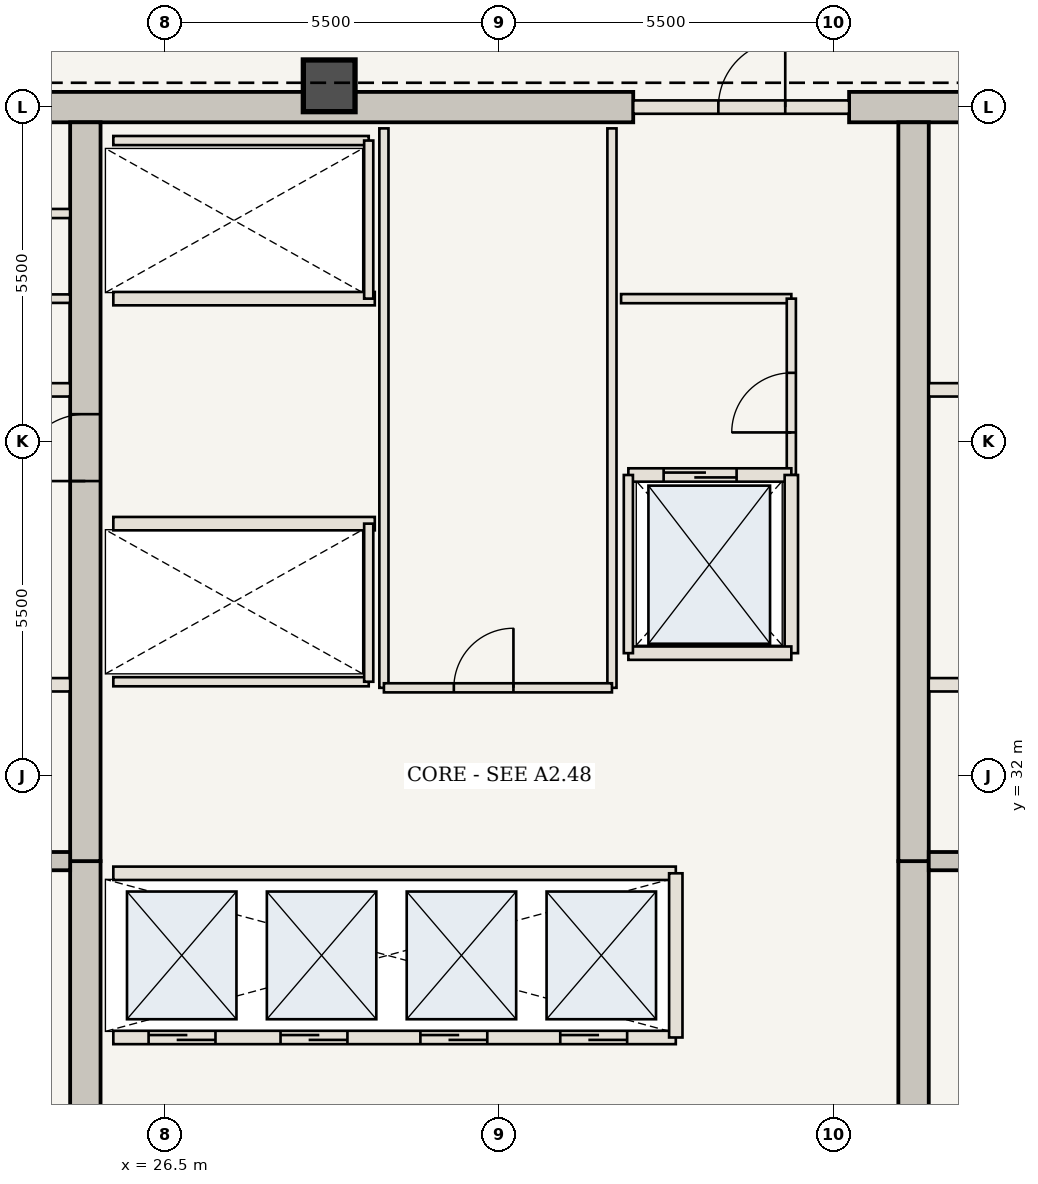
"""IFC4 building model, lengths in metres.
Left out: names, types, materials, properties, quantities, classifications, styles, units other than length and angle.
Written with IfcOpenShell. Run it as: python <this file> out.ifc"""

import sys

from ifc_helpers import new_model, si_unit, direction, frame, frame_2d, origin, origin_2d, place, context, subcontext, project, spatial, rectangle, extrude, element, fill, save


model = new_model("IFC4")
c1 = context("Model", 3, precision=1e-05, world=origin(), true_north=direction((0.0, 1.0)))
c2 = subcontext(c1, "Body", "Model", "MODEL_VIEW")
j1 = project(units=[si_unit("LENGTHUNIT", "METRE"), si_unit("PLANEANGLEUNIT", "RADIAN")], contexts=[c1])
p1 = place(None, origin())
s1 = spatial("IfcSite", under=j1, at=p1, CompositionType="ELEMENT")
p2 = place(p1, origin())
s2 = spatial("IfcBuilding", under=s1, at=p2, CompositionType="ELEMENT")
p3 = place(p2, frame((0.0, 0.0, 217.7)))
s3 = spatial("IfcBuildingStorey", under=s2, at=p3, CompositionType="ELEMENT", Elevation=217.7)
p4 = place(p3, frame((21.41, 43.0, 0.0), z_axis=(0.0, 0.0, 1.0), x_axis=(1.0, 0.0, 0.0)))
e1 = element("IfcWall", 1, at=p4, inside=s3, PredefinedType="SHEAR", context=c2, shape_type="SweptSolid", body=[
    extrude(rectangle(XDim=12.79, YDim=0.5, at=frame_2d((6.395, 0.0))), origin(), (0.0, 0.0, 1.0), 3.85),
])
p5 = place(p3, frame((37.75, 43.0, 0.0), z_axis=(0.0, 0.0, 1.0), x_axis=(1.0, 0.0, 0.0)))
e2 = element("IfcWall", 2, at=p5, inside=s3, PredefinedType="SHEAR", context=c2, shape_type="SweptSolid", body=[
    extrude(rectangle(XDim=4.84, YDim=0.5, at=frame_2d((2.42, 0.0))), origin(), (0.0, 0.0, 1.0), 3.85),
])
p6 = place(p3, frame((25.19, 21.2, 0.0), z_axis=(0.0, 0.0, 1.0), x_axis=(0.0, 1.0, 0.0)))
e3 = element("IfcWall", 3, at=p6, inside=s3, PredefinedType="SHEAR", context=c2, shape_type="SweptSolid", body=[
    extrude(rectangle(XDim=9.4, YDim=0.5, at=frame_2d((4.7, 0.0))), origin(), (0.0, 0.0, 1.0), 3.85),
])
p7 = place(p3, frame((25.19, 30.6, 0.0), z_axis=(0.0, 0.0, 1.0), x_axis=(0.0, 1.0, 0.0)))
e4 = element("IfcWall", 4, at=p7, inside=s3, PredefinedType="SHEAR", context=c2, shape_type="SweptSolid", body=[
    extrude(rectangle(XDim=12.15, YDim=0.5, at=frame_2d((6.075, 0.0))), origin(), (0.0, 0.0, 1.0), 3.85),
])
p8 = place(p7, frame((6.25, 0.0, 0.0)))
e5 = element("IfcOpeningElement", 5, at=p8, cuts=e4, PredefinedType="OPENING", context=c2, shape_type="SweptSolid", body=[
    extrude(rectangle(XDim=1.1, YDim=2.15, at=frame_2d((0.55, 1.075))), frame((0.0, 0.26, 0.0), z_axis=(0.0, -1.0, 0.0), x_axis=(1.0, 0.0, 0.0)), (0.0, 0.0, 1.0), 0.52),
])
p9 = place(p3, frame((38.81, 21.2, 0.0), z_axis=(0.0, 0.0, 1.0), x_axis=(0.0, 1.0, 0.0)))
e6 = element("IfcWall", 6, at=p9, inside=s3, PredefinedType="SHEAR", context=c2, shape_type="SweptSolid", body=[
    extrude(rectangle(XDim=9.4, YDim=0.5, at=frame_2d((4.7, 0.0))), origin(), (0.0, 0.0, 1.0), 3.85),
])
p10 = place(p3, frame((38.81, 30.6, 0.0), z_axis=(0.0, 0.0, 1.0), x_axis=(0.0, 1.0, 0.0)))
e7 = element("IfcWall", 7, at=p10, inside=s3, PredefinedType="SHEAR", context=c2, shape_type="SweptSolid", body=[
    extrude(rectangle(XDim=12.15, YDim=0.5, at=frame_2d((6.075, 0.0))), origin(), (0.0, 0.0, 1.0), 3.85),
])
p11 = place(p3, frame((29.2, 43.35, 0.0), z_axis=(0.0, 0.0, 1.0), x_axis=(1.0, 0.0, 0.0)))
e8 = element("IfcColumn", 8, at=p11, inside=s3, PredefinedType="COLUMN", context=c2, shape_type="SweptSolid", body=[
    extrude(rectangle(XDim=0.85, YDim=0.85, at=origin_2d()), origin(), (0.0, 0.0, 1.0), 3.85),
])
for number, where, z_axis, x_axis in (
    (9, (21.41, 30.6, 0.0), (0.0, 0.0, 1.0), (1.0, 0.0, 0.0)),
    (10, (39.06, 30.6, 0.0), (0.0, 0.0, 1.0), (1.0, 0.0, 0.0)),
):
    element("IfcWall", number, at=place(p3, frame(where, z_axis=z_axis, x_axis=x_axis)), inside=s3, PredefinedType="SHEAR", context=c2, shape_type="SweptSolid", body=[
        extrude(rectangle(XDim=3.53, YDim=0.3, at=frame_2d((1.765, 0.0))), origin(), (0.0, 0.0, 1.0), 3.685),
    ])
p12 = place(p3, frame((21.41, 33.5, 0.0), z_axis=(0.0, 0.0, 1.0), x_axis=(1.0, 0.0, 0.0)))
e11 = element("IfcWall", 11, at=p12, inside=s3, PredefinedType="STANDARD", context=c2, shape_type="SweptSolid", body=[
    extrude(rectangle(XDim=3.53, YDim=0.22, at=frame_2d((1.765, 0.0))), origin(), (0.0, 0.0, 1.0), 3.685),
])
p13 = place(p12, frame((0.75, 0.0, 0.0)))
e12 = element("IfcOpeningElement", 12, at=p13, cuts=e11, PredefinedType="OPENING", context=c2, shape_type="SweptSolid", body=[
    extrude(rectangle(XDim=1.2, YDim=2.2, at=frame_2d((0.6, 1.1))), frame((0.0, 0.12, 0.0), z_axis=(0.0, -1.0, 0.0), x_axis=(1.0, 0.0, 0.0)), (0.0, 0.0, 1.0), 0.24),
])
p14 = place(p3, frame((39.06, 33.5, 0.0), z_axis=(0.0, 0.0, 1.0), x_axis=(1.0, 0.0, 0.0)))
e13 = element("IfcWall", 13, at=p14, inside=s3, PredefinedType="STANDARD", context=c2, shape_type="SweptSolid", body=[
    extrude(rectangle(XDim=3.53, YDim=0.22, at=frame_2d((1.765, 0.0))), origin(), (0.0, 0.0, 1.0), 3.685),
])
p15 = place(p14, frame((1.55, 0.0, 0.0)))
e14 = element("IfcOpeningElement", 14, at=p15, cuts=e13, PredefinedType="OPENING", context=c2, shape_type="SweptSolid", body=[
    extrude(rectangle(XDim=1.2, YDim=2.2, at=frame_2d((0.6, 1.1))), frame((0.0, 0.12, 0.0), z_axis=(0.0, -1.0, 0.0), x_axis=(1.0, 0.0, 0.0)), (0.0, 0.0, 1.0), 0.24),
])
for number, where, z_axis, x_axis in (
    (15, (21.41, 38.35, 0.0), (0.0, 0.0, 1.0), (1.0, 0.0, 0.0)),
    (16, (39.06, 38.35, 0.0), (0.0, 0.0, 1.0), (1.0, 0.0, 0.0)),
):
    element("IfcWall", number, at=place(p3, frame(where, z_axis=z_axis, x_axis=x_axis)), inside=s3, PredefinedType="STANDARD", context=c2, shape_type="SweptSolid", body=[
        extrude(rectangle(XDim=3.53, YDim=0.22, at=frame_2d((1.765, 0.0))), origin(), (0.0, 0.0, 1.0), 3.685),
    ])
p16 = place(p3, frame((21.41, 39.85, 0.0), z_axis=(0.0, 0.0, 1.0), x_axis=(1.0, 0.0, 0.0)))
e17 = element("IfcWall", 17, at=p16, inside=s3, PredefinedType="STANDARD", context=c2, shape_type="SweptSolid", body=[
    extrude(rectangle(XDim=3.53, YDim=0.14, at=frame_2d((1.765, 0.0))), origin(), (0.0, 0.0, 1.0), 3.685),
])
p17 = place(p3, frame((21.41, 41.25, 0.0), z_axis=(0.0, 0.0, 1.0), x_axis=(1.0, 0.0, 0.0)))
e18 = element("IfcWall", 18, at=p17, inside=s3, PredefinedType="STANDARD", context=c2, shape_type="SweptSolid", body=[
    extrude(rectangle(XDim=3.53, YDim=0.15, at=frame_2d((1.765, 0.0))), origin(), (0.0, 0.0, 1.0), 3.685),
])
p18 = place(p3, frame((34.0, 39.85, 0.0), z_axis=(0.0, 0.0, 1.0), x_axis=(1.0, 0.0, 0.0)))
e19 = element("IfcWall", 19, at=p18, inside=s3, PredefinedType="STANDARD", context=c2, shape_type="SweptSolid", body=[
    extrude(rectangle(XDim=2.8, YDim=0.15, at=frame_2d((1.4, 0.0))), origin(), (0.0, 0.0, 1.0), 3.685),
])
p19 = place(p3, frame((36.8, 36.95, 0.0), z_axis=(0.0, 0.0, 1.0), x_axis=(0.0, 1.0, 0.0)))
e20 = element("IfcWall", 20, at=p19, inside=s3, PredefinedType="STANDARD", context=c2, shape_type="SweptSolid", body=[
    extrude(rectangle(XDim=2.9, YDim=0.15, at=frame_2d((1.45, 0.0))), origin(), (0.0, 0.0, 1.0), 3.685),
])
p20 = place(p19, frame((0.7, 0.0, 0.0)))
e21 = element("IfcOpeningElement", 21, at=p20, cuts=e20, PredefinedType="OPENING", context=c2, shape_type="SweptSolid", body=[
    extrude(rectangle(XDim=0.98, YDim=2.2, at=frame_2d((0.49, 1.1))), frame((0.0, 0.085, 0.0), z_axis=(0.0, -1.0, 0.0), x_axis=(1.0, 0.0, 0.0)), (0.0, 0.0, 1.0), 0.17),
])
p21 = place(p3, frame((25.65, 27.7, 0.0), z_axis=(0.0, 0.0, 1.0), x_axis=(1.0, 0.0, 0.0)))
e22 = element("IfcWall", 22, at=p21, inside=s3, PredefinedType="STANDARD", context=c2, shape_type="SweptSolid", body=[
    extrude(rectangle(XDim=9.25, YDim=0.22, at=frame_2d((4.625, 0.0))), origin(), (0.0, 0.0, 1.0), 3.685),
])
p22 = place(p21, frame((0.58, 0.0, 0.0)))
e23 = element("IfcOpeningElement", 23, at=p22, cuts=e22, PredefinedType="OPENING", context=c2, shape_type="SweptSolid", body=[
    extrude(rectangle(XDim=1.1, YDim=2.15, at=frame_2d((0.55, 1.075))), frame((0.0, 0.12, 0.0), z_axis=(0.0, -1.0, 0.0), x_axis=(1.0, 0.0, 0.0)), (0.0, 0.0, 1.0), 0.24),
])
p23 = place(p21, frame((2.75, 0.0, 0.0)))
e24 = element("IfcOpeningElement", 24, at=p23, cuts=e22, PredefinedType="OPENING", context=c2, shape_type="SweptSolid", body=[
    extrude(rectangle(XDim=1.1, YDim=2.15, at=frame_2d((0.55, 1.075))), frame((0.0, 0.12, 0.0), z_axis=(0.0, -1.0, 0.0), x_axis=(1.0, 0.0, 0.0)), (0.0, 0.0, 1.0), 0.24),
])
p24 = place(p21, frame((5.05, 0.0, 0.0)))
e25 = element("IfcOpeningElement", 25, at=p24, cuts=e22, PredefinedType="OPENING", context=c2, shape_type="SweptSolid", body=[
    extrude(rectangle(XDim=1.1, YDim=2.15, at=frame_2d((0.55, 1.075))), frame((0.0, 0.12, 0.0), z_axis=(0.0, -1.0, 0.0), x_axis=(1.0, 0.0, 0.0)), (0.0, 0.0, 1.0), 0.24),
])
p25 = place(p21, frame((7.35, 0.0, 0.0)))
e26 = element("IfcOpeningElement", 26, at=p25, cuts=e22, PredefinedType="OPENING", context=c2, shape_type="SweptSolid", body=[
    extrude(rectangle(XDim=1.1, YDim=2.15, at=frame_2d((0.55, 1.075))), frame((0.0, 0.12, 0.0), z_axis=(0.0, -1.0, 0.0), x_axis=(1.0, 0.0, 0.0)), (0.0, 0.0, 1.0), 0.24),
])
p26 = place(p3, frame((25.65, 30.4, 0.0), z_axis=(0.0, 0.0, 1.0), x_axis=(1.0, 0.0, 0.0)))
e27 = element("IfcWall", 27, at=p26, inside=s3, PredefinedType="STANDARD", context=c2, shape_type="SweptSolid", body=[
    extrude(rectangle(XDim=9.25, YDim=0.22, at=frame_2d((4.625, 0.0))), origin(), (0.0, 0.0, 1.0), 3.685),
])
p27 = place(p3, frame((34.9, 27.7, 0.0), z_axis=(0.0, 0.0, 1.0), x_axis=(0.0, 1.0, 0.0)))
e28 = element("IfcWall", 28, at=p27, inside=s3, PredefinedType="STANDARD", context=c2, shape_type="SweptSolid", body=[
    extrude(rectangle(XDim=2.7, YDim=0.22, at=frame_2d((1.35, 0.0))), origin(), (0.0, 0.0, 1.0), 3.685),
])
p28 = place(p3, frame((25.65, 36.15, 0.0), z_axis=(0.0, 0.0, 1.0), x_axis=(1.0, 0.0, 0.0)))
e29 = element("IfcWall", 29, at=p28, inside=s3, PredefinedType="STANDARD", context=c2, shape_type="SweptSolid", body=[
    extrude(rectangle(XDim=4.3, YDim=0.22, at=frame_2d((2.15, 0.0))), origin(), (0.0, 0.0, 1.0), 3.685),
])
p29 = place(p3, frame((25.65, 33.55, 0.0), z_axis=(0.0, 0.0, 1.0), x_axis=(1.0, 0.0, 0.0)))
e30 = element("IfcWall", 30, at=p29, inside=s3, PredefinedType="STANDARD", context=c2, shape_type="SweptSolid", body=[
    extrude(rectangle(XDim=4.2, YDim=0.15, at=frame_2d((2.1, 0.0))), origin(), (0.0, 0.0, 1.0), 3.685),
])
p30 = place(p3, frame((29.85, 33.55, 0.0), z_axis=(0.0, 0.0, 1.0), x_axis=(0.0, 1.0, 0.0)))
e31 = element("IfcWall", 31, at=p30, inside=s3, PredefinedType="STANDARD", context=c2, shape_type="SweptSolid", body=[
    extrude(rectangle(XDim=2.6, YDim=0.15, at=frame_2d((1.3, 0.0))), origin(), (0.0, 0.0, 1.0), 3.685),
])
p31 = place(p3, frame((25.65, 39.85, 0.0), z_axis=(0.0, 0.0, 1.0), x_axis=(1.0, 0.0, 0.0)))
e32 = element("IfcWall", 32, at=p31, inside=s3, PredefinedType="STANDARD", context=c2, shape_type="SweptSolid", body=[
    extrude(rectangle(XDim=4.3, YDim=0.22, at=frame_2d((2.15, 0.0))), origin(), (0.0, 0.0, 1.0), 3.685),
])
p32 = place(p3, frame((25.65, 42.45, 0.0), z_axis=(0.0, 0.0, 1.0), x_axis=(1.0, 0.0, 0.0)))
e33 = element("IfcWall", 33, at=p32, inside=s3, PredefinedType="STANDARD", context=c2, shape_type="SweptSolid", body=[
    extrude(rectangle(XDim=4.2, YDim=0.15, at=frame_2d((2.1, 0.0))), origin(), (0.0, 0.0, 1.0), 3.685),
])
p33 = place(p3, frame((29.85, 39.85, 0.0), z_axis=(0.0, 0.0, 1.0), x_axis=(0.0, 1.0, 0.0)))
e34 = element("IfcWall", 34, at=p33, inside=s3, PredefinedType="STANDARD", context=c2, shape_type="SweptSolid", body=[
    extrude(rectangle(XDim=2.6, YDim=0.15, at=frame_2d((1.3, 0.0))), origin(), (0.0, 0.0, 1.0), 3.685),
])
for number, where, z_axis, x_axis in (
    (35, (30.1, 33.45, 0.0), (0.0, 0.0, 1.0), (0.0, 1.0, 0.0)),
    (36, (33.85, 33.45, 0.0), (0.0, 0.0, 1.0), (0.0, 1.0, 0.0)),
):
    element("IfcWall", number, at=place(p3, frame(where, z_axis=z_axis, x_axis=x_axis)), inside=s3, PredefinedType="STANDARD", context=c2, shape_type="SweptSolid", body=[
        extrude(rectangle(XDim=9.2, YDim=0.15, at=frame_2d((4.6, 0.0))), origin(), (0.0, 0.0, 1.0), 3.685),
    ])
p34 = place(p3, frame((30.1, 33.45, 0.0), z_axis=(0.0, 0.0, 1.0), x_axis=(1.0, 0.0, 0.0)))
e37 = element("IfcWall", 37, at=p34, inside=s3, PredefinedType="STANDARD", context=c2, shape_type="SweptSolid", body=[
    extrude(rectangle(XDim=3.75, YDim=0.15, at=frame_2d((1.875, 0.0))), origin(), (0.0, 0.0, 1.0), 3.685),
])
p35 = place(p34, frame((1.15, 0.0, 0.0)))
e38 = element("IfcOpeningElement", 38, at=p35, cuts=e37, PredefinedType="OPENING", context=c2, shape_type="SweptSolid", body=[
    extrude(rectangle(XDim=0.98, YDim=2.2, at=frame_2d((0.49, 1.1))), frame((0.0, 0.085, 0.0), z_axis=(0.0, -1.0, 0.0), x_axis=(1.0, 0.0, 0.0)), (0.0, 0.0, 1.0), 0.17),
])
p36 = place(p3, frame((34.2, 43.0, 0.0), z_axis=(0.0, 0.0, 1.0), x_axis=(1.0, 0.0, 0.0)))
e39 = element("IfcWall", 39, at=p36, inside=s3, PredefinedType="STANDARD", context=c2, shape_type="SweptSolid", body=[
    extrude(rectangle(XDim=3.55, YDim=0.22, at=frame_2d((1.775, 0.0))), origin(), (0.0, 0.0, 1.0), 3.685),
])
p37 = place(p36, frame((1.4, 0.0, 0.0)))
e40 = element("IfcOpeningElement", 40, at=p37, cuts=e39, PredefinedType="OPENING", context=c2, shape_type="SweptSolid", body=[
    extrude(rectangle(XDim=1.1, YDim=2.15, at=frame_2d((0.55, 1.075))), frame((0.0, 0.12, 0.0), z_axis=(0.0, -1.0, 0.0), x_axis=(1.0, 0.0, 0.0)), (0.0, 0.0, 1.0), 0.24),
])
p38 = place(p3, frame((34.12, 36.95, 0.0), z_axis=(0.0, 0.0, 1.0), x_axis=(1.0, 0.0, 0.0)))
e41 = element("IfcWall", 41, at=p38, inside=s3, PredefinedType="STANDARD", context=c2, shape_type="SweptSolid", body=[
    extrude(rectangle(XDim=2.68, YDim=0.22, at=frame_2d((1.34, 0.0))), origin(), (0.0, 0.0, 1.0), 3.685),
])
p39 = place(p38, frame((0.58, 0.0, 0.0)))
e42 = element("IfcOpeningElement", 42, at=p39, cuts=e41, PredefinedType="OPENING", context=c2, shape_type="SweptSolid", body=[
    extrude(rectangle(XDim=1.2, YDim=2.2, at=frame_2d((0.6, 1.1))), frame((0.0, 0.12, 0.0), z_axis=(0.0, -1.0, 0.0), x_axis=(1.0, 0.0, 0.0)), (0.0, 0.0, 1.0), 0.24),
])
p40 = place(p3, frame((36.8, 34.02, 0.0), z_axis=(0.0, 0.0, 1.0), x_axis=(0.0, 1.0, 0.0)))
e43 = element("IfcWall", 43, at=p40, inside=s3, PredefinedType="STANDARD", context=c2, shape_type="SweptSolid", body=[
    extrude(rectangle(XDim=2.93, YDim=0.22, at=frame_2d((1.465, 0.0))), origin(), (0.0, 0.0, 1.0), 3.685),
])
p41 = place(p3, frame((34.12, 34.02, 0.0), z_axis=(0.0, 0.0, 1.0), x_axis=(1.0, 0.0, 0.0)))
e44 = element("IfcWall", 44, at=p41, inside=s3, PredefinedType="STANDARD", context=c2, shape_type="SweptSolid", body=[
    extrude(rectangle(XDim=2.68, YDim=0.22, at=frame_2d((1.34, 0.0))), origin(), (0.0, 0.0, 1.0), 3.685),
])
p42 = place(p3, frame((34.12, 34.02, 0.0), z_axis=(0.0, 0.0, 1.0), x_axis=(0.0, 1.0, 0.0)))
e45 = element("IfcWall", 45, at=p42, inside=s3, PredefinedType="STANDARD", context=c2, shape_type="SweptSolid", body=[
    extrude(rectangle(XDim=2.93, YDim=0.15, at=frame_2d((1.465, 0.0))), origin(), (0.0, 0.0, 1.0), 3.685),
])
p43 = place(p8, origin())
e46 = element("IfcDoor", 46, at=p43, inside=s3, OperationType="SINGLE_SWING_LEFT", PredefinedType="DOOR", context=c2, shape_type="SweptSolid", body=[
    extrude(rectangle(XDim=1.1, YDim=2.15, at=frame_2d((0.55, 1.075))), frame((0.0, 0.025, 0.0), z_axis=(0.0, -1.0, 0.0), x_axis=(1.0, 0.0, 0.0)), (0.0, 0.0, 1.0), 0.05),
])
fill(e5, e46)
p44 = place(p20, origin())
e47 = element("IfcDoor", 47, at=p44, inside=s3, OperationType="SINGLE_SWING_LEFT", PredefinedType="DOOR", context=c2, shape_type="SweptSolid", body=[
    extrude(rectangle(XDim=0.98, YDim=2.2, at=frame_2d((0.49, 1.1))), frame((0.0, 0.025, 0.0), z_axis=(0.0, -1.0, 0.0), x_axis=(1.0, 0.0, 0.0)), (0.0, 0.0, 1.0), 0.05),
])
fill(e21, e47)
p45 = place(p22, origin())
e48 = element("IfcDoor", 48, at=p45, inside=s3, OperationType="DOUBLE_DOOR_SLIDING", PredefinedType="DOOR", context=c2, shape_type="SweptSolid", body=[
    extrude(rectangle(XDim=1.1, YDim=2.15, at=frame_2d((0.55, 1.075))), frame((0.0, 0.025, 0.0), z_axis=(0.0, -1.0, 0.0), x_axis=(1.0, 0.0, 0.0)), (0.0, 0.0, 1.0), 0.05),
])
fill(e23, e48)
p46 = place(p23, origin())
e49 = element("IfcDoor", 49, at=p46, inside=s3, OperationType="DOUBLE_DOOR_SLIDING", PredefinedType="DOOR", context=c2, shape_type="SweptSolid", body=[
    extrude(rectangle(XDim=1.1, YDim=2.15, at=frame_2d((0.55, 1.075))), frame((0.0, 0.025, 0.0), z_axis=(0.0, -1.0, 0.0), x_axis=(1.0, 0.0, 0.0)), (0.0, 0.0, 1.0), 0.05),
])
fill(e24, e49)
p47 = place(p24, origin())
e50 = element("IfcDoor", 50, at=p47, inside=s3, OperationType="DOUBLE_DOOR_SLIDING", PredefinedType="DOOR", context=c2, shape_type="SweptSolid", body=[
    extrude(rectangle(XDim=1.1, YDim=2.15, at=frame_2d((0.55, 1.075))), frame((0.0, 0.025, 0.0), z_axis=(0.0, -1.0, 0.0), x_axis=(1.0, 0.0, 0.0)), (0.0, 0.0, 1.0), 0.05),
])
fill(e25, e50)
p48 = place(p25, origin())
e51 = element("IfcDoor", 51, at=p48, inside=s3, OperationType="DOUBLE_DOOR_SLIDING", PredefinedType="DOOR", context=c2, shape_type="SweptSolid", body=[
    extrude(rectangle(XDim=1.1, YDim=2.15, at=frame_2d((0.55, 1.075))), frame((0.0, 0.025, 0.0), z_axis=(0.0, -1.0, 0.0), x_axis=(1.0, 0.0, 0.0)), (0.0, 0.0, 1.0), 0.05),
])
fill(e26, e51)
p49 = place(p35, origin())
e52 = element("IfcDoor", 52, at=p49, inside=s3, OperationType="SINGLE_SWING_RIGHT", PredefinedType="DOOR", context=c2, shape_type="SweptSolid", body=[
    extrude(rectangle(XDim=0.98, YDim=2.2, at=frame_2d((0.49, 1.1))), frame((0.0, 0.025, 0.0), z_axis=(0.0, -1.0, 0.0), x_axis=(1.0, 0.0, 0.0)), (0.0, 0.0, 1.0), 0.05),
])
fill(e38, e52)
p50 = place(p37, origin())
e53 = element("IfcDoor", 53, at=p50, inside=s3, OperationType="SINGLE_SWING_RIGHT", PredefinedType="DOOR", context=c2, shape_type="SweptSolid", body=[
    extrude(rectangle(XDim=1.1, YDim=2.15, at=frame_2d((0.55, 1.075))), frame((0.0, 0.025, 0.0), z_axis=(0.0, -1.0, 0.0), x_axis=(1.0, 0.0, 0.0)), (0.0, 0.0, 1.0), 0.05),
])
fill(e40, e53)
p51 = place(p39, origin())
e54 = element("IfcDoor", 54, at=p51, inside=s3, OperationType="DOUBLE_DOOR_SLIDING", PredefinedType="DOOR", context=c2, shape_type="SweptSolid", body=[
    extrude(rectangle(XDim=1.2, YDim=2.2, at=frame_2d((0.6, 1.1))), frame((0.0, 0.025, 0.0), z_axis=(0.0, -1.0, 0.0), x_axis=(1.0, 0.0, 0.0)), (0.0, 0.0, 1.0), 0.05),
])
fill(e42, e54)
save(model, sys.argv[1])
